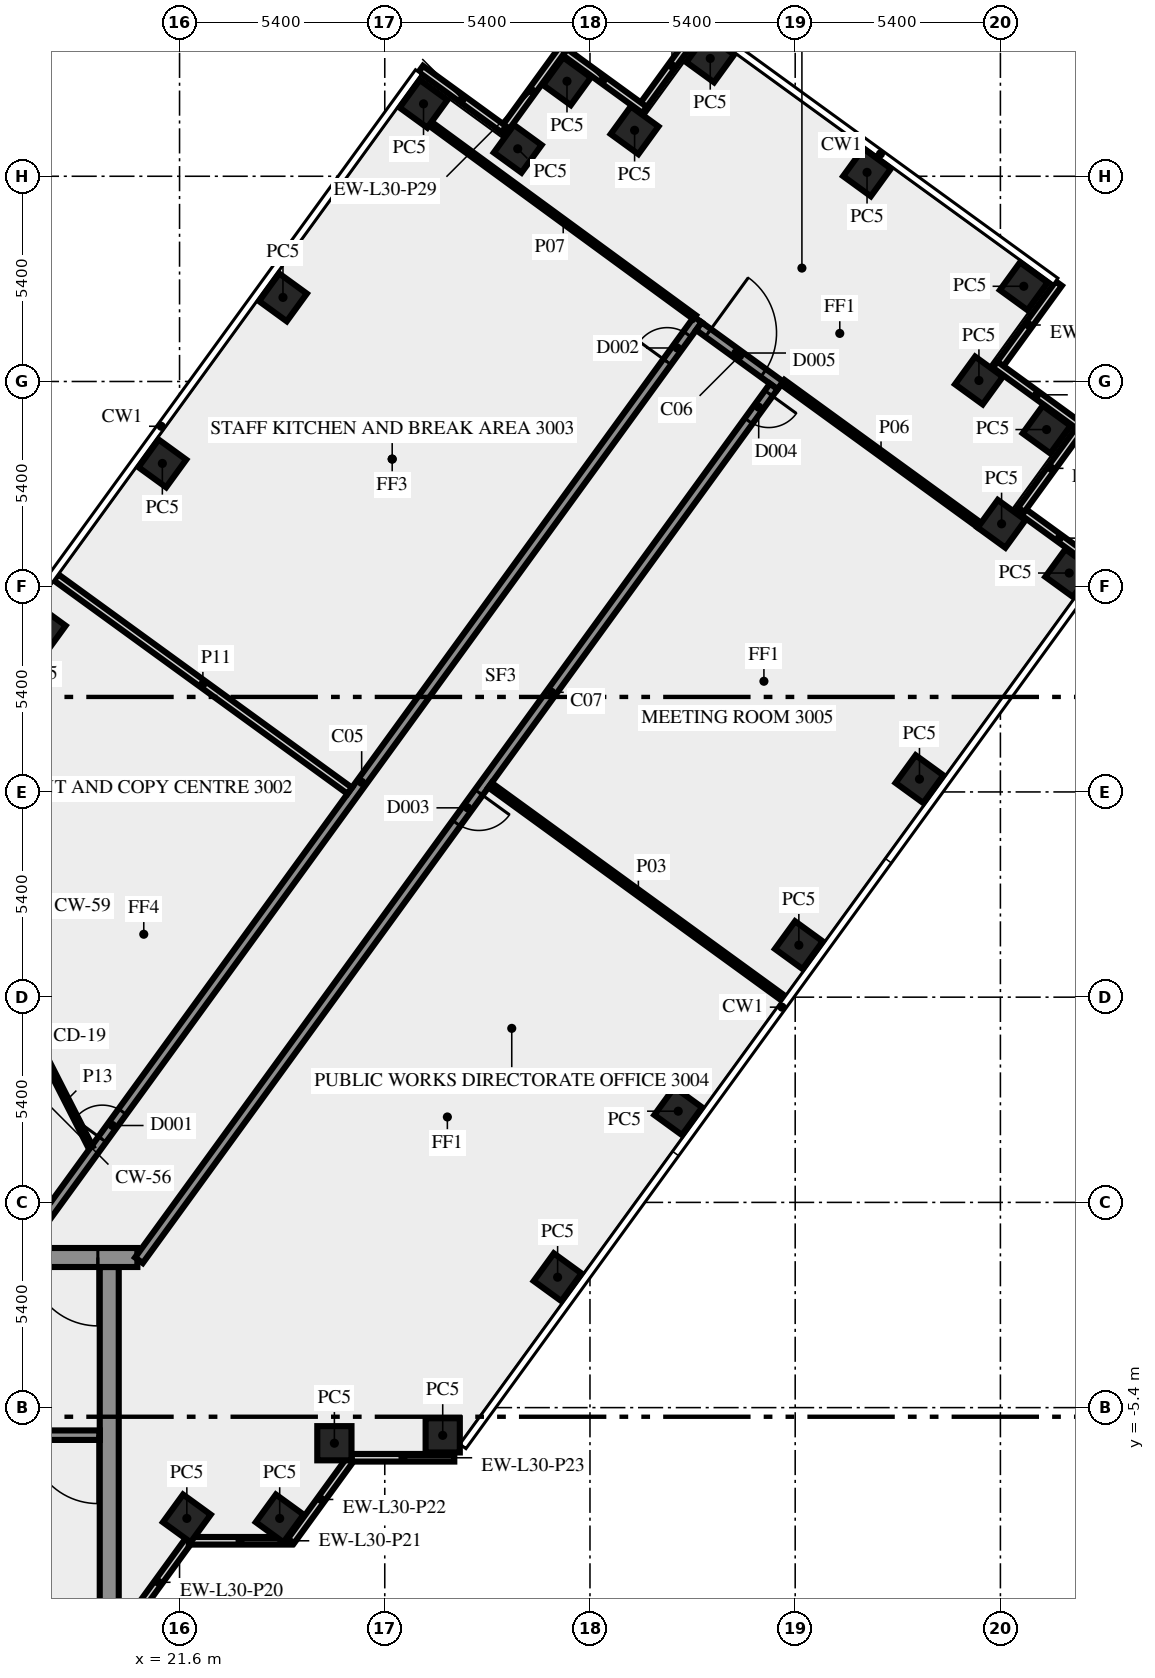
"""IFC4 building model, lengths in metres.
Left out: names, types, materials, properties, quantities, classifications, styles, units other than length and angle.
Written with IfcOpenShell. Run it as: python <this file> out.ifc"""

import sys

from ifc_helpers import new_model, si_unit, direction, frame, frame_2d, origin, origin_2d, place, context, subcontext, project, spatial, rectangle, extrude, element, fill, save


model = new_model("IFC4")
c1 = context("Model", 3, precision=1e-05, world=origin(), true_north=direction((0.0, 1.0)))
c2 = subcontext(c1, "Body", "Model", "MODEL_VIEW")
j1 = project(units=[si_unit("LENGTHUNIT", "METRE"), si_unit("PLANEANGLEUNIT", "RADIAN")], contexts=[c1])
p1 = place(None, origin())
s1 = spatial("IfcSite", under=j1, at=p1, CompositionType="ELEMENT")
p2 = place(p1, origin())
s2 = spatial("IfcBuilding", under=s1, at=p2, CompositionType="ELEMENT")
p3 = place(p2, frame((0.0, 0.0, 129.0)))
s3 = spatial("IfcBuildingStorey", under=s2, at=p3, CompositionType="ELEMENT", Elevation=129.0)
for number, where, z_axis, x_axis in (
    (1, (21.792, -8.315, 0.0), (0.0, 0.0, 1.0), (0.588, 0.809, 0.0)),
    (2, (24.235, -8.315, 0.0), (0.0, 0.0, 1.0), (0.588, 0.809, 0.0)),
    (3, (25.674, -6.337, 0.0), (0.0, 0.0, 1.0), (1.0, 0.0, 0.0)),
    (4, (28.525, -6.13, 0.0), (0.0, 0.0, 1.0), (1.0, 0.0, 0.0)),
    (5, (31.548, -1.969, 0.0), (0.0, 0.0, 1.0), (0.588, 0.809, 0.0)),
    (6, (34.722, 2.4, 0.0), (0.0, 0.0, 1.0), (0.588, 0.809, 0.0)),
    (7, (37.896, 6.769, 0.0), (0.0, 0.0, 1.0), (0.588, 0.809, 0.0)),
    (8, (41.07, 11.137, 0.0), (0.0, 0.0, 1.0), (0.588, 0.809, 0.0)),
    (9, (45.01, 16.56, 0.0), (0.0, 0.0, 1.0), (0.588, 0.809, 0.0)),
    (10, (43.231, 17.854, 0.0), (0.0, 0.0, 1.0), (0.588, 0.809, 0.0)),
    (11, (44.415, 20.335, 0.0), (0.0, 0.0, 1.0), (0.588, 0.809, 0.0)),
    (12, (42.635, 21.626, 0.0), (0.0, 0.0, 1.0), (-0.809, 0.588, 0.0)),
    (13, (43.815, 24.105, 0.0), (0.0, 0.0, 1.0), (-0.809, 0.588, 0.0)),
    (14, (39.691, 27.102, 0.0), (0.0, 0.0, 1.0), (-0.809, 0.588, 0.0)),
    (15, (35.565, 30.1, 0.0), (0.0, 0.0, 1.0), (-0.588, -0.809, 0.0)),
    (16, (33.574, 28.209, 0.0), (0.0, 0.0, 1.0), (-0.809, 0.588, 0.0)),
    (17, (31.795, 29.5, 0.0), (0.0, 0.0, 1.0), (-0.588, -0.809, 0.0)),
    (18, (30.499, 27.723, 0.0), (0.0, 0.0, 1.0), (-0.809, 0.588, 0.0)),
    (19, (28.02, 28.905, 0.0), (0.0, 0.0, 1.0), (-0.809, 0.588, 0.0)),
    (20, (24.321, 23.812, 0.0), (0.0, 0.0, 1.0), (-0.588, -0.809, 0.0)),
    (21, (21.147, 19.444, 0.0), (0.0, 0.0, 1.0), (-0.588, -0.809, 0.0)),
    (22, (17.974, 15.075, 0.0), (0.0, 0.0, 1.0), (-0.588, -0.809, 0.0)),
):
    element("IfcColumn", number, at=place(p3, frame(where, z_axis=z_axis, x_axis=x_axis)), inside=s3, PredefinedType="COLUMN", context=c2, shape_type="SweptSolid", body=[
        extrude(rectangle(XDim=0.9, YDim=0.9, at=origin_2d()), origin(), (0.0, 0.0, 1.0), 3.4),
    ])
p4 = place(p3, frame((20.253, -11.083, 0.0), z_axis=(0.0, 0.0, 1.0), x_axis=(0.587766567315, 0.809030569476, 0.0)))
e23 = element("IfcWall", 23, at=p4, inside=s3, PredefinedType="SOLIDWALL", context=c2, shape_type="SweptSolid", body=[
    extrude(rectangle(XDim=2.688, YDim=0.2, at=frame_2d((1.344, 0.0))), origin(), (0.0, 0.0, 1.0), 3.4),
])
p5 = place(p3, frame((21.843, -8.904, 0.0), z_axis=(0.0, 0.0, 1.0), x_axis=(1.0, 0.0, 0.0)))
e24 = element("IfcWall", 24, at=p5, inside=s3, PredefinedType="SOLIDWALL", context=c2, shape_type="SweptSolid", body=[
    extrude(rectangle(XDim=2.7, YDim=0.2, at=frame_2d((1.35, 0.0))), origin(), (0.0, 0.0, 1.0), 3.4),
])
p6 = place(p3, frame((24.533, -8.909, 0.0), z_axis=(0.0, 0.0, 1.0), x_axis=(0.587720002413, 0.809064397168, 0.0)))
e25 = element("IfcWall", 25, at=p6, inside=s3, PredefinedType="SOLIDWALL", context=c2, shape_type="SweptSolid", body=[
    extrude(rectangle(XDim=2.7, YDim=0.2, at=frame_2d((1.35, 0.0))), origin(), (0.0, 0.0, 1.0), 3.4),
])
for number, where, z_axis, x_axis in (
    (26, (26.13, -6.719, 0.0), (0.0, 0.0, 1.0), (1.0, 0.0, 0.0)),
    (27, (43.149, 21.994, 0.0), (0.0, 0.0, 1.0), (0.588, 0.809, 0.0)),
    (28, (35.351, 30.997, 0.0), (0.0, 0.0, 1.0), (-0.588, -0.809, 0.0)),
    (29, (33.838, 28.744, 0.0), (0.0, 0.0, 1.0), (-0.809, 0.588, 0.0)),
    (30, (31.67, 30.333, 0.0), (0.0, 0.0, 1.0), (-0.588, -0.809, 0.0)),
    (31, (30.133, 28.237, 0.0), (0.0, 0.0, 1.0), (-0.809, 0.588, 0.0)),
    (32, (45.842, 16.685, 0.0), (0.0, 0.0, 1.0), (-0.809, 0.588, 0.0)),
    (33, (43.746, 18.223, 0.0), (0.0, 0.0, 1.0), (0.588, 0.809, 0.0)),
    (34, (45.245, 20.456, 0.0), (0.0, 0.0, 1.0), (-0.809, 0.588, 0.0)),
):
    element("IfcWall", number, at=place(p3, frame(where, z_axis=z_axis, x_axis=x_axis)), inside=s3, PredefinedType="SOLIDWALL", context=c2, shape_type="SweptSolid", body=[
        extrude(rectangle(XDim=2.7, YDim=0.2, at=frame_2d((1.35, 0.0))), origin(), (0.0, 0.0, 1.0), 3.4),
    ])
p7 = place(p3, frame((19.75, -10.5, 0.0), z_axis=(0.0, 0.0, 1.0), x_axis=(0.0, 1.0, 0.0)))
e35 = element("IfcWall", 35, at=p7, inside=s3, PredefinedType="SHEAR", context=c2, shape_type="SweptSolid", body=[
    extrude(rectangle(XDim=8.8, YDim=0.5, at=frame_2d((4.4, 0.0))), origin(), (0.0, 0.0, 1.0), 3.4),
])
p8 = place(p3, frame((19.5, -6.125, 0.0), z_axis=(0.0, 0.0, 1.0), x_axis=(-1.0, 0.0, 0.0)))
e36 = element("IfcWall", 36, at=p8, inside=s3, PredefinedType="SHEAR", context=c2, shape_type="SweptSolid", body=[
    extrude(rectangle(XDim=8.05, YDim=0.25, at=frame_2d((4.025, 0.0))), origin(), (0.0, 0.0, 1.0), 3.4),
])
p9 = place(p8, frame((0.05, 0.0, 0.0)))
e37 = element("IfcOpeningElement", 37, at=p9, cuts=e36, PredefinedType="OPENING", context=c2, shape_type="SweptSolid", body=[
    extrude(rectangle(XDim=1.8, YDim=2.1, at=frame_2d((0.9, 1.05))), frame((0.0, 0.135, 0.0), z_axis=(0.0, -1.0, 0.0), x_axis=(1.0, 0.0, 0.0)), (0.0, 0.0, 1.0), 0.27),
])
p10 = place(p3, frame((20.49, -1.45, 0.0), z_axis=(0.0, 0.0, 1.0), x_axis=(-1.0, 0.0, 0.0)))
e38 = element("IfcWall", 38, at=p10, inside=s3, PredefinedType="SHEAR", context=c2, shape_type="SweptSolid", body=[
    extrude(rectangle(XDim=40.98, YDim=0.5, at=frame_2d((20.49, 0.0))), origin(), (0.0, 0.0, 1.0), 3.4),
])
p11 = place(p10, frame((38.14, 0.0, 0.0)))
e39 = element("IfcOpeningElement", 39, at=p11, cuts=e38, PredefinedType="OPENING", context=c2, shape_type="SweptSolid", body=[
    extrude(rectangle(XDim=1.8, YDim=2.1, at=frame_2d((0.9, 1.05))), frame((0.0, 0.26, 0.0), z_axis=(0.0, -1.0, 0.0), x_axis=(1.0, 0.0, 0.0)), (0.0, 0.0, 1.0), 0.52),
])
p12 = place(p10, frame((35.89, 0.0, 0.0)))
e40 = element("IfcOpeningElement", 40, at=p12, cuts=e38, PredefinedType="OPENING", context=c2, shape_type="SweptSolid", body=[
    extrude(rectangle(XDim=0.9, YDim=2.1, at=frame_2d((0.45, 1.05))), frame((0.0, 0.26, 0.0), z_axis=(0.0, -1.0, 0.0), x_axis=(1.0, 0.0, 0.0)), (0.0, 0.0, 1.0), 0.52),
])
p13 = place(p10, frame((32.94, 0.0, 0.0)))
e41 = element("IfcOpeningElement", 41, at=p13, cuts=e38, PredefinedType="OPENING", context=c2, shape_type="SweptSolid", body=[
    extrude(rectangle(XDim=0.9, YDim=2.1, at=frame_2d((0.45, 1.05))), frame((0.0, 0.26, 0.0), z_axis=(0.0, -1.0, 0.0), x_axis=(1.0, 0.0, 0.0)), (0.0, 0.0, 1.0), 0.52),
])
p14 = place(p10, frame((19.59, 0.0, 0.0)))
e42 = element("IfcOpeningElement", 42, at=p14, cuts=e38, PredefinedType="OPENING", context=c2, shape_type="SweptSolid", body=[
    extrude(rectangle(XDim=2.0, YDim=2.1, at=frame_2d((1.0, 1.05))), frame((0.0, 0.26, 0.0), z_axis=(0.0, -1.0, 0.0), x_axis=(1.0, 0.0, 0.0)), (0.0, 0.0, 1.0), 0.52),
])
p15 = place(p10, frame((7.14, 0.0, 0.0)))
e43 = element("IfcOpeningElement", 43, at=p15, cuts=e38, PredefinedType="OPENING", context=c2, shape_type="SweptSolid", body=[
    extrude(rectangle(XDim=0.9, YDim=2.1, at=frame_2d((0.45, 1.05))), frame((0.0, 0.26, 0.0), z_axis=(0.0, -1.0, 0.0), x_axis=(1.0, 0.0, 0.0)), (0.0, 0.0, 1.0), 0.52),
])
p16 = place(p10, frame((5.028, 0.0, 0.0)))
e44 = element("IfcOpeningElement", 44, at=p16, cuts=e38, PredefinedType="OPENING", context=c2, shape_type="SweptSolid", body=[
    extrude(rectangle(XDim=0.8, YDim=2.1, at=frame_2d((0.4, 1.05))), frame((0.0, 0.26, 0.0), z_axis=(0.0, -1.0, 0.0), x_axis=(1.0, 0.0, 0.0)), (0.0, 0.0, 1.0), 0.52),
])
p17 = place(p10, frame((3.452, 0.0, 0.0)))
e45 = element("IfcOpeningElement", 45, at=p17, cuts=e38, PredefinedType="OPENING", context=c2, shape_type="SweptSolid", body=[
    extrude(rectangle(XDim=0.8, YDim=2.1, at=frame_2d((0.4, 1.05))), frame((0.0, 0.26, 0.0), z_axis=(0.0, -1.0, 0.0), x_axis=(1.0, 0.0, 0.0)), (0.0, 0.0, 1.0), 0.52),
])
p18 = place(p10, frame((1.04, 0.0, 0.0)))
e46 = element("IfcOpeningElement", 46, at=p18, cuts=e38, PredefinedType="OPENING", context=c2, shape_type="SweptSolid", body=[
    extrude(rectangle(XDim=1.8, YDim=2.1, at=frame_2d((0.9, 1.05))), frame((0.0, 0.26, 0.0), z_axis=(0.0, -1.0, 0.0), x_axis=(1.0, 0.0, 0.0)), (0.0, 0.0, 1.0), 0.52),
])
p19 = place(p3, frame((17.545, -1.125, 0.0), z_axis=(0.0, 0.0, 1.0), x_axis=(0.587786330937, 0.809016210693, 0.0)))
e47 = element("IfcWall", 47, at=p19, inside=s3, PredefinedType="SOLIDWALL", context=c2, shape_type="SweptSolid", body=[
    extrude(rectangle(XDim=30.103, YDim=0.25, at=frame_2d((15.052, 0.0))), origin(), (0.0, 0.0, 1.0), 3.4),
])
p20 = place(p19, frame((3.441, 0.0, 0.0)))
e48 = element("IfcOpeningElement", 48, at=p20, cuts=e47, PredefinedType="OPENING", context=c2, shape_type="SweptSolid", body=[
    extrude(rectangle(XDim=0.9, YDim=2.1, at=frame_2d((0.45, 1.05))), frame((0.0, 0.135, 0.0), z_axis=(0.0, -1.0, 0.0), x_axis=(1.0, 0.0, 0.0)), (0.0, 0.0, 1.0), 0.27),
])
p21 = place(p19, frame((28.729, 0.0, 0.0)))
e49 = element("IfcOpeningElement", 49, at=p21, cuts=e47, PredefinedType="OPENING", context=c2, shape_type="SweptSolid", body=[
    extrude(rectangle(XDim=0.9, YDim=2.1, at=frame_2d((0.45, 1.05))), frame((0.0, 0.135, 0.0), z_axis=(0.0, -1.0, 0.0), x_axis=(1.0, 0.0, 0.0)), (0.0, 0.0, 1.0), 0.27),
])
p22 = place(p3, frame((35.267, 23.054, 0.0), z_axis=(0.0, 0.0, 1.0), x_axis=(0.809038743598, -0.587755315891, 0.0)))
e50 = element("IfcWall", 50, at=p22, inside=s3, PredefinedType="SOLIDWALL", context=c2, shape_type="SweptSolid", body=[
    extrude(rectangle(XDim=2.65, YDim=0.25, at=frame_2d((1.325, 0.0))), origin(), (0.0, 0.0, 1.0), 3.4),
])
p23 = place(p22, frame((0.3, 0.0, 0.0)))
e51 = element("IfcOpeningElement", 51, at=p23, cuts=e50, PredefinedType="OPENING", context=c2, shape_type="SweptSolid", body=[
    extrude(rectangle(XDim=1.8, YDim=2.1, at=frame_2d((0.9, 1.05))), frame((0.0, 0.135, 0.0), z_axis=(0.0, -1.0, 0.0), x_axis=(1.0, 0.0, 0.0)), (0.0, 0.0, 1.0), 0.27),
])
p24 = place(p3, frame((37.236, 21.469, 0.0), z_axis=(0.0, 0.0, 1.0), x_axis=(-0.58778344073, -0.809018310549, 0.0)))
e52 = element("IfcWall", 52, at=p24, inside=s3, PredefinedType="SOLIDWALL", context=c2, shape_type="SweptSolid", body=[
    extrude(rectangle(XDim=28.42, YDim=0.25, at=frame_2d((14.21, 0.0))), origin(), (0.0, 0.0, 1.0), 3.4),
])
p25 = place(p24, frame((13.205, 0.0, 0.0)))
e53 = element("IfcOpeningElement", 53, at=p25, cuts=e52, PredefinedType="OPENING", context=c2, shape_type="SweptSolid", body=[
    extrude(rectangle(XDim=1.0, YDim=2.1, at=frame_2d((0.5, 1.05))), frame((0.0, 0.135, 0.0), z_axis=(0.0, -1.0, 0.0), x_axis=(1.0, 0.0, 0.0)), (0.0, 0.0, 1.0), 0.27),
])
p26 = place(p24, frame((0.224, 0.0, 0.0)))
e54 = element("IfcOpeningElement", 54, at=p26, cuts=e52, PredefinedType="OPENING", context=c2, shape_type="SweptSolid", body=[
    extrude(rectangle(XDim=0.9, YDim=2.1, at=frame_2d((0.45, 1.05))), frame((0.0, 0.135, 0.0), z_axis=(0.0, -1.0, 0.0), x_axis=(1.0, 0.0, 0.0)), (0.0, 0.0, 1.0), 0.27),
])
p27 = place(p3, frame((37.577, 5.307, 0.0), z_axis=(0.0, 0.0, 1.0), x_axis=(-0.809032429128, 0.587764007591, 0.0)))
e55 = element("IfcWall", 55, at=p27, inside=s3, PredefinedType="PARTITIONING", context=c2, shape_type="SweptSolid", body=[
    extrude(rectangle(XDim=9.651, YDim=0.15, at=frame_2d((4.826, 0.0))), origin(), (0.0, 0.0, 1.0), 2.5),
])
p28 = place(p3, frame((42.646, 17.823, 0.0), z_axis=(0.0, 0.0, 1.0), x_axis=(-0.80900675786, 0.587799341388, 0.0)))
e56 = element("IfcWall", 56, at=p28, inside=s3, PredefinedType="PARTITIONING", context=c2, shape_type="SweptSolid", body=[
    extrude(rectangle(XDim=6.395, YDim=0.15, at=frame_2d((3.197, 0.0))), origin(), (0.0, 0.0, 1.0), 3.4),
])
p29 = place(p3, frame((28.238, 28.352, 0.0), z_axis=(0.0, 0.0, 1.0), x_axis=(0.806980651863, -0.590577875913, 0.0)))
e57 = element("IfcWall", 57, at=p29, inside=s3, PredefinedType="PARTITIONING", context=c2, shape_type="SweptSolid", body=[
    extrude(rectangle(XDim=8.57, YDim=0.12, at=frame_2d((4.285, 0.0))), origin(), (0.0, 0.0, 1.0), 3.4),
])
p30 = place(p3, frame((26.077, 10.832, 0.0), z_axis=(0.0, 0.0, 1.0), x_axis=(-0.809052142986, 0.587736871338, 0.0)))
e58 = element("IfcWall", 58, at=p30, inside=s3, PredefinedType="SOLIDWALL", context=c2, shape_type="SweptSolid", body=[
    extrude(rectangle(XDim=9.55, YDim=0.2, at=frame_2d((4.775, 0.0))), origin(), (0.0, 0.0, 1.0), 2.5),
])
p31 = place(p3, frame((18.0, 3.925, 0.0), z_axis=(0.0, 0.0, 1.0), x_axis=(0.453950796792, -0.891026752736, 0.0)))
e59 = element("IfcWall", 59, at=p31, inside=s3, PredefinedType="PARTITIONING", context=c2, shape_type="SweptSolid", body=[
    extrude(rectangle(XDim=2.778, YDim=0.12, at=frame_2d((1.389, 0.0))), origin(), (0.0, 0.0, 1.0), 3.4),
])
p32 = place(p9, origin())
e60 = element("IfcDoor", 60, at=p32, inside=s3, OperationType="DOUBLE_DOOR_SINGLE_SWING", PredefinedType="DOOR", context=c2, shape_type="SweptSolid", body=[
    extrude(rectangle(XDim=1.8, YDim=2.1, at=frame_2d((0.9, 1.05))), frame((0.0, 0.025, 0.0), z_axis=(0.0, -1.0, 0.0), x_axis=(1.0, 0.0, 0.0)), (0.0, 0.0, 1.0), 0.05),
])
fill(e37, e60)
p33 = place(p18, origin())
e61 = element("IfcDoor", 61, at=p33, inside=s3, OperationType="DOUBLE_DOOR_SINGLE_SWING", PredefinedType="DOOR", context=c2, shape_type="SweptSolid", body=[
    extrude(rectangle(XDim=1.8, YDim=2.1, at=frame_2d((0.9, 1.05))), frame((0.0, 0.025, 0.0), z_axis=(0.0, -1.0, 0.0), x_axis=(1.0, 0.0, 0.0)), (0.0, 0.0, 1.0), 0.05),
])
fill(e46, e61)
p34 = place(p25, origin())
e62 = element("IfcDoor", 62, at=p34, inside=s3, OperationType="SINGLE_SWING_LEFT", PredefinedType="DOOR", context=c2, shape_type="SweptSolid", body=[
    extrude(rectangle(XDim=1.0, YDim=2.1, at=frame_2d((0.5, 1.05))), frame((0.0, 0.025, 0.0), z_axis=(0.0, -1.0, 0.0), x_axis=(1.0, 0.0, 0.0)), (0.0, 0.0, 1.0), 0.05),
])
fill(e53, e62)
p35 = place(p26, origin())
e63 = element("IfcDoor", 63, at=p35, inside=s3, OperationType="SINGLE_SWING_LEFT", PredefinedType="DOOR", context=c2, shape_type="SweptSolid", body=[
    extrude(rectangle(XDim=0.9, YDim=2.1, at=frame_2d((0.45, 1.05))), frame((0.0, 0.025, 0.0), z_axis=(0.0, -1.0, 0.0), x_axis=(1.0, 0.0, 0.0)), (0.0, 0.0, 1.0), 0.05),
])
fill(e54, e63)
p36 = place(p23, origin())
e64 = element("IfcDoor", 64, at=p36, inside=s3, OperationType="DOUBLE_DOOR_SINGLE_SWING", PredefinedType="DOOR", context=c2, shape_type="SweptSolid", body=[
    extrude(rectangle(XDim=1.8, YDim=2.1, at=frame_2d((0.9, 1.05))), frame((0.0, 0.025, 0.0), z_axis=(0.0, -1.0, 0.0), x_axis=(1.0, 0.0, 0.0)), (0.0, 0.0, 1.0), 0.05),
])
fill(e51, e64)
p37 = place(p20, origin())
e65 = element("IfcDoor", 65, at=p37, inside=s3, OperationType="SINGLE_SWING_LEFT", PredefinedType="DOOR", context=c2, shape_type="SweptSolid", body=[
    extrude(rectangle(XDim=0.9, YDim=2.1, at=frame_2d((0.45, 1.05))), frame((0.0, 0.025, 0.0), z_axis=(0.0, -1.0, 0.0), x_axis=(1.0, 0.0, 0.0)), (0.0, 0.0, 1.0), 0.05),
])
fill(e48, e65)
p38 = place(p21, origin())
e66 = element("IfcDoor", 66, at=p38, inside=s3, OperationType="SINGLE_SWING_RIGHT", PredefinedType="DOOR", context=c2, shape_type="SweptSolid", body=[
    extrude(rectangle(XDim=0.9, YDim=2.1, at=frame_2d((0.45, 1.05))), frame((0.0, 0.025, 0.0), z_axis=(0.0, -1.0, 0.0), x_axis=(1.0, 0.0, 0.0)), (0.0, 0.0, 1.0), 0.05),
])
fill(e49, e66)
save(model, sys.argv[1])
